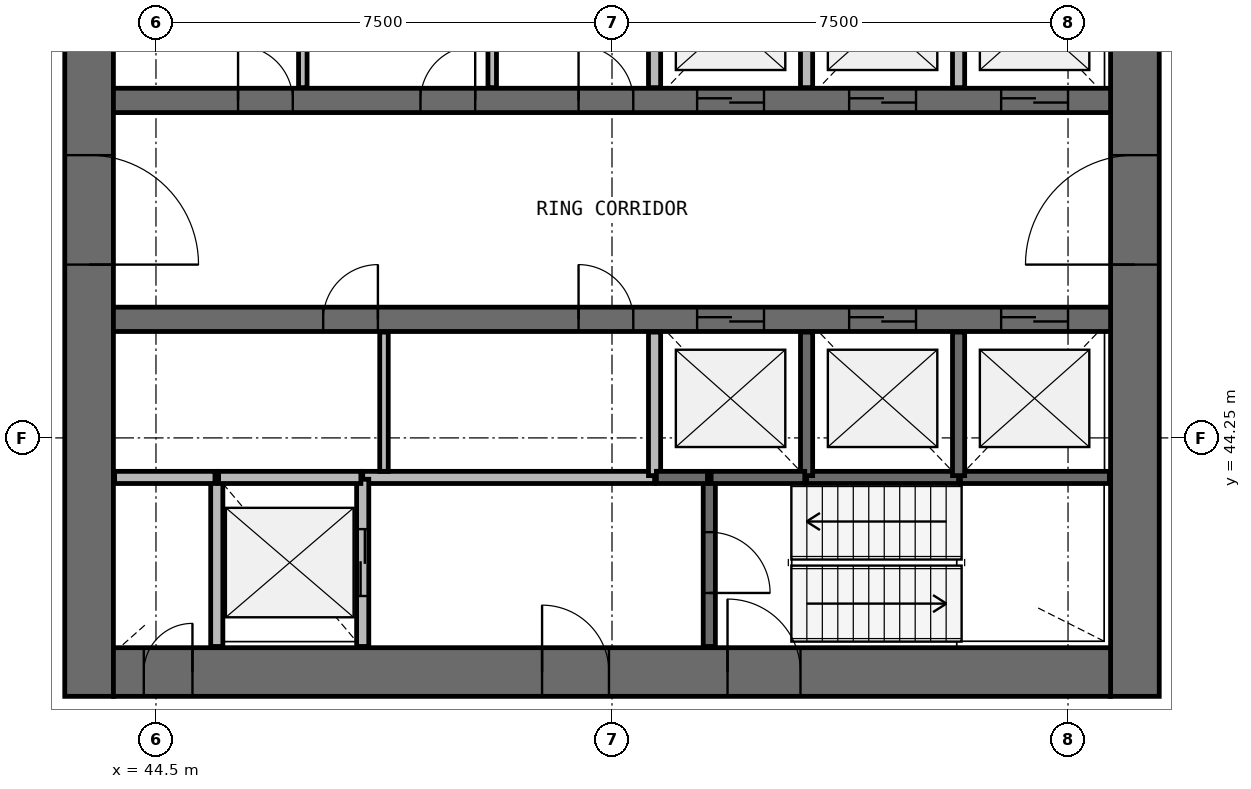
"""IFC4 building model, lengths in metres.
Left out: names, types, materials, properties, quantities, classifications, styles, units other than length and angle.
Written with IfcOpenShell. Run it as: python <this file> out.ifc"""

import sys

from ifc_helpers import new_model, si_unit, direction, frame, frame_2d, origin, place, context, subcontext, project, spatial, rectangle, extrude, source, transform, mapped, element, fill, save


model = new_model("IFC4")
c1 = context("Model", 3, precision=1e-05, world=origin(), true_north=direction((0.0, 1.0)))
c2 = subcontext(c1, "Body", "Model", "MODEL_VIEW")
j1 = project(units=[si_unit("LENGTHUNIT", "METRE"), si_unit("PLANEANGLEUNIT", "RADIAN")], contexts=[c1])
p1 = place(None, origin())
s1 = spatial("IfcSite", under=j1, at=p1, CompositionType="ELEMENT")
p2 = place(p1, origin())
s2 = spatial("IfcBuilding", under=s1, at=p2, CompositionType="ELEMENT")
p3 = place(p2, frame((0.0, 0.0, 168.2)))
s3 = spatial("IfcBuildingStorey", under=s2, at=p3, CompositionType="ELEMENT", Elevation=168.2)
p4 = place(p3, frame((60.6, 40.0, 0.0), z_axis=(0.0, 0.0, 1.0), x_axis=(0.0, 1.0, 0.0)))
e1 = element("IfcWall", 1, at=p4, inside=s3, PredefinedType="SHEAR", context=c2, shape_type="SweptSolid", body=[
    extrude(rectangle(XDim=16.0, YDim=0.8, at=frame_2d((8.0, 0.0))), origin(), (0.0, 0.0, 1.0), 3.9),
])
p5 = place(p4, frame((7.1, 0.0, 0.0)))
e2 = element("IfcOpeningElement", 2, at=p5, cuts=e1, PredefinedType="OPENING", context=c2, shape_type="SweptSolid", body=[
    extrude(rectangle(XDim=1.8, YDim=2.1, at=frame_2d((0.9, 1.05))), frame((0.0, 0.41, 0.0), z_axis=(0.0, -1.0, 0.0), x_axis=(1.0, 0.0, 0.0)), (0.0, 0.0, 1.0), 0.82),
])
p6 = place(p3, frame((43.4, 56.0, 0.0), z_axis=(0.0, 0.0, 1.0), x_axis=(0.0, -1.0, 0.0)))
e3 = element("IfcWall", 3, at=p6, inside=s3, PredefinedType="SHEAR", context=c2, shape_type="SweptSolid", body=[
    extrude(rectangle(XDim=16.0, YDim=0.8, at=frame_2d((8.0, 0.0))), origin(), (0.0, 0.0, 1.0), 3.9),
])
p7 = place(p6, frame((7.1, 0.0, 0.0)))
e4 = element("IfcOpeningElement", 4, at=p7, cuts=e3, PredefinedType="OPENING", context=c2, shape_type="SweptSolid", body=[
    extrude(rectangle(XDim=1.8, YDim=2.1, at=frame_2d((0.9, 1.05))), frame((0.0, 0.41, 0.0), z_axis=(0.0, -1.0, 0.0), x_axis=(1.0, 0.0, 0.0)), (0.0, 0.0, 1.0), 0.82),
])
p8 = place(p3, frame((43.8, 40.4, 0.0), z_axis=(0.0, 0.0, 1.0), x_axis=(1.0, 0.0, 0.0)))
e5 = element("IfcWall", 5, at=p8, inside=s3, PredefinedType="SHEAR", context=c2, shape_type="SweptSolid", body=[
    extrude(rectangle(XDim=16.4, YDim=0.8, at=frame_2d((8.2, 0.0))), origin(), (0.0, 0.0, 1.0), 3.9),
])
p9 = place(p8, frame((10.1, 0.0, 0.0)))
e6 = element("IfcOpeningElement", 6, at=p9, cuts=e5, PredefinedType="OPENING", context=c2, shape_type="SweptSolid", body=[
    extrude(rectangle(XDim=1.2, YDim=2.1, at=frame_2d((0.6, 1.05))), frame((0.0, 0.41, 0.0), z_axis=(0.0, -1.0, 0.0), x_axis=(1.0, 0.0, 0.0)), (0.0, 0.0, 1.0), 0.82),
])
p10 = place(p8, frame((7.05, 0.0, 0.0)))
e7 = element("IfcOpeningElement", 7, at=p10, cuts=e5, PredefinedType="OPENING", context=c2, shape_type="SweptSolid", body=[
    extrude(rectangle(XDim=1.1, YDim=2.1, at=frame_2d((0.55, 1.05))), frame((0.0, 0.41, 0.0), z_axis=(0.0, -1.0, 0.0), x_axis=(1.0, 0.0, 0.0)), (0.0, 0.0, 1.0), 0.82),
])
p11 = place(p8, frame((0.5, 0.0, 0.0)))
e8 = element("IfcOpeningElement", 8, at=p11, cuts=e5, PredefinedType="OPENING", context=c2, shape_type="SweptSolid", body=[
    extrude(rectangle(XDim=0.8, YDim=2.1, at=frame_2d((0.4, 1.05))), frame((0.0, 0.41, 0.0), z_axis=(0.0, -1.0, 0.0), x_axis=(1.0, 0.0, 0.0)), (0.0, 0.0, 1.0), 0.82),
])
p12 = place(p3, frame((43.8, 49.8, 0.0), z_axis=(0.0, 0.0, 1.0), x_axis=(1.0, 0.0, 0.0)))
e9 = element("IfcWall", 9, at=p12, inside=s3, PredefinedType="SHEAR", context=c2, shape_type="SweptSolid", body=[
    extrude(rectangle(XDim=16.4, YDim=0.4, at=frame_2d((8.2, 0.0))), origin(), (0.0, 0.0, 1.0), 3.9),
])
p13 = place(p12, frame((9.6, 0.0, 0.0)))
e10 = element("IfcOpeningElement", 10, at=p13, cuts=e9, PredefinedType="OPENING", context=c2, shape_type="SweptSolid", body=[
    extrude(rectangle(XDim=1.1, YDim=2.1, at=frame_2d((0.55, 1.05))), frame((0.0, 0.21, 0.0), z_axis=(0.0, -1.0, 0.0), x_axis=(1.0, 0.0, 0.0)), (0.0, 0.0, 1.0), 0.42),
])
p14 = place(p12, frame((12.1, 0.0, 0.0)))
e11 = element("IfcOpeningElement", 11, at=p14, cuts=e9, PredefinedType="OPENING", context=c2, shape_type="SweptSolid", body=[
    extrude(rectangle(XDim=1.1, YDim=2.1, at=frame_2d((0.55, 1.05))), frame((0.0, 0.21, 0.0), z_axis=(0.0, -1.0, 0.0), x_axis=(1.0, 0.0, 0.0)), (0.0, 0.0, 1.0), 0.42),
])
p15 = place(p12, frame((14.6, 0.0, 0.0)))
e12 = element("IfcOpeningElement", 12, at=p15, cuts=e9, PredefinedType="OPENING", context=c2, shape_type="SweptSolid", body=[
    extrude(rectangle(XDim=1.1, YDim=2.1, at=frame_2d((0.55, 1.05))), frame((0.0, 0.21, 0.0), z_axis=(0.0, -1.0, 0.0), x_axis=(1.0, 0.0, 0.0)), (0.0, 0.0, 1.0), 0.42),
])
p16 = place(p12, frame((2.05, 0.0, 0.0)))
e13 = element("IfcOpeningElement", 13, at=p16, cuts=e9, PredefinedType="OPENING", context=c2, shape_type="SweptSolid", body=[
    extrude(rectangle(XDim=0.9, YDim=2.1, at=frame_2d((0.45, 1.05))), frame((0.0, 0.21, 0.0), z_axis=(0.0, -1.0, 0.0), x_axis=(1.0, 0.0, 0.0)), (0.0, 0.0, 1.0), 0.42),
])
p17 = place(p12, frame((5.05, 0.0, 0.0)))
e14 = element("IfcOpeningElement", 14, at=p17, cuts=e9, PredefinedType="OPENING", context=c2, shape_type="SweptSolid", body=[
    extrude(rectangle(XDim=0.9, YDim=2.1, at=frame_2d((0.45, 1.05))), frame((0.0, 0.21, 0.0), z_axis=(0.0, -1.0, 0.0), x_axis=(1.0, 0.0, 0.0)), (0.0, 0.0, 1.0), 0.42),
])
p18 = place(p12, frame((7.65, 0.0, 0.0)))
e15 = element("IfcOpeningElement", 15, at=p18, cuts=e9, PredefinedType="OPENING", context=c2, shape_type="SweptSolid", body=[
    extrude(rectangle(XDim=0.9, YDim=2.1, at=frame_2d((0.45, 1.05))), frame((0.0, 0.21, 0.0), z_axis=(0.0, -1.0, 0.0), x_axis=(1.0, 0.0, 0.0)), (0.0, 0.0, 1.0), 0.42),
])
p19 = place(p3, frame((43.8, 46.2, 0.0), z_axis=(0.0, 0.0, 1.0), x_axis=(1.0, 0.0, 0.0)))
e16 = element("IfcWall", 16, at=p19, inside=s3, PredefinedType="SHEAR", context=c2, shape_type="SweptSolid", body=[
    extrude(rectangle(XDim=16.4, YDim=0.4, at=frame_2d((8.2, 0.0))), origin(), (0.0, 0.0, 1.0), 3.9),
])
p20 = place(p19, frame((9.6, 0.0, 0.0)))
e17 = element("IfcOpeningElement", 17, at=p20, cuts=e16, PredefinedType="OPENING", context=c2, shape_type="SweptSolid", body=[
    extrude(rectangle(XDim=1.1, YDim=2.1, at=frame_2d((0.55, 1.05))), frame((0.0, 0.21, 0.0), z_axis=(0.0, -1.0, 0.0), x_axis=(1.0, 0.0, 0.0)), (0.0, 0.0, 1.0), 0.42),
])
p21 = place(p19, frame((12.1, 0.0, 0.0)))
e18 = element("IfcOpeningElement", 18, at=p21, cuts=e16, PredefinedType="OPENING", context=c2, shape_type="SweptSolid", body=[
    extrude(rectangle(XDim=1.1, YDim=2.1, at=frame_2d((0.55, 1.05))), frame((0.0, 0.21, 0.0), z_axis=(0.0, -1.0, 0.0), x_axis=(1.0, 0.0, 0.0)), (0.0, 0.0, 1.0), 0.42),
])
p22 = place(p19, frame((14.6, 0.0, 0.0)))
e19 = element("IfcOpeningElement", 19, at=p22, cuts=e16, PredefinedType="OPENING", context=c2, shape_type="SweptSolid", body=[
    extrude(rectangle(XDim=1.1, YDim=2.1, at=frame_2d((0.55, 1.05))), frame((0.0, 0.21, 0.0), z_axis=(0.0, -1.0, 0.0), x_axis=(1.0, 0.0, 0.0)), (0.0, 0.0, 1.0), 0.42),
])
p23 = place(p19, frame((3.45, 0.0, 0.0)))
e20 = element("IfcOpeningElement", 20, at=p23, cuts=e16, PredefinedType="OPENING", context=c2, shape_type="SweptSolid", body=[
    extrude(rectangle(XDim=0.9, YDim=2.1, at=frame_2d((0.45, 1.05))), frame((0.0, 0.21, 0.0), z_axis=(0.0, -1.0, 0.0), x_axis=(1.0, 0.0, 0.0)), (0.0, 0.0, 1.0), 0.42),
])
p24 = place(p19, frame((7.65, 0.0, 0.0)))
e21 = element("IfcOpeningElement", 21, at=p24, cuts=e16, PredefinedType="OPENING", context=c2, shape_type="SweptSolid", body=[
    extrude(rectangle(XDim=0.9, YDim=2.1, at=frame_2d((0.45, 1.05))), frame((0.0, 0.21, 0.0), z_axis=(0.0, -1.0, 0.0), x_axis=(1.0, 0.0, 0.0)), (0.0, 0.0, 1.0), 0.42),
])
p25 = place(p3, frame((52.7, 43.6, 0.0), z_axis=(0.0, 0.0, 1.0), x_axis=(-1.0, 0.0, 0.0)))
e22 = element("IfcWall", 22, at=p25, inside=s3, PredefinedType="SOLIDWALL", context=c2, shape_type="SweptSolid", body=[
    extrude(rectangle(XDim=4.8, YDim=0.2, at=frame_2d((2.4, 0.0))), origin(), (0.0, 0.0, 1.0), 3.58),
])
p26 = place(p3, frame((45.5, 43.6, 0.0), z_axis=(0.0, 0.0, 1.0), x_axis=(0.0, -1.0, 0.0)))
e23 = element("IfcWall", 23, at=p26, inside=s3, PredefinedType="SOLIDWALL", context=c2, shape_type="SweptSolid", body=[
    extrude(rectangle(XDim=2.78, YDim=0.2, at=frame_2d((1.39, 0.0))), origin(), (0.0, 0.0, 1.0), 3.58),
])
p27 = place(p3, frame((47.9, 40.82, 0.0), z_axis=(0.0, 0.0, 1.0), x_axis=(0.0, 1.0, 0.0)))
e24 = element("IfcWall", 24, at=p27, inside=s3, PredefinedType="SOLIDWALL", context=c2, shape_type="SweptSolid", body=[
    extrude(rectangle(XDim=2.75, YDim=0.2, at=frame_2d((1.375, 0.0))), origin(), (0.0, 0.0, 1.0), 3.58),
])
p28 = place(p27, frame((0.83, 0.0, 0.0)))
e25 = element("IfcOpeningElement", 25, at=p28, cuts=e24, PredefinedType="OPENING", context=c2, shape_type="SweptSolid", body=[
    extrude(rectangle(XDim=1.1, YDim=2.1, at=frame_2d((0.55, 1.05))), frame((0.0, 0.11, 0.0), z_axis=(0.0, -1.0, 0.0), x_axis=(1.0, 0.0, 0.0)), (0.0, 0.0, 1.0), 0.22),
])
p29 = place(p3, frame((53.6, 43.6, 0.0), z_axis=(0.0, 0.0, 1.0), x_axis=(0.0, -1.0, 0.0)))
e26 = element("IfcWall", 26, at=p29, inside=s3, PredefinedType="SOLIDWALL", context=c2, shape_type="SweptSolid", body=[
    extrude(rectangle(XDim=2.78, YDim=0.2, at=frame_2d((1.39, 0.0))), origin(), (0.0, 0.0, 1.0), 3.58),
])
p30 = place(p29, frame((0.9, 0.0, 0.0)))
e27 = element("IfcOpeningElement", 27, at=p30, cuts=e26, PredefinedType="OPENING", context=c2, shape_type="SweptSolid", body=[
    extrude(rectangle(XDim=1.0, YDim=2.1, at=frame_2d((0.5, 1.05))), frame((0.0, 0.11, 0.0), z_axis=(0.0, -1.0, 0.0), x_axis=(1.0, 0.0, 0.0)), (0.0, 0.0, 1.0), 0.22),
])
p31 = place(p3, frame((55.2, 43.6, 0.0), z_axis=(0.0, 0.0, 1.0), x_axis=(1.0, 0.0, 0.0)))
e28 = element("IfcWall", 28, at=p31, inside=s3, PredefinedType="SOLIDWALL", context=c2, shape_type="SweptSolid", body=[
    extrude(rectangle(XDim=2.5, YDim=0.2, at=frame_2d((1.25, 0.0))), origin(), (0.0, 0.0, 1.0), 3.58),
])
p32 = place(p3, frame((57.73, 43.6, 0.0), z_axis=(0.0, 0.0, 1.0), x_axis=(1.0, 0.0, 0.0)))
e29 = element("IfcWall", 29, at=p32, inside=s3, PredefinedType="SOLIDWALL", context=c2, shape_type="SweptSolid", body=[
    extrude(rectangle(XDim=2.45, YDim=0.2, at=frame_2d((1.225, 0.0))), origin(), (0.0, 0.0, 1.0), 3.58),
])
p33 = place(p3, frame((47.87, 43.6, 0.0), z_axis=(0.0, 0.0, 1.0), x_axis=(-1.0, 0.0, 0.0)))
e30 = element("IfcWall", 30, at=p33, inside=s3, PredefinedType="SOLIDWALL", context=c2, shape_type="SweptSolid", body=[
    extrude(rectangle(XDim=2.34, YDim=0.2, at=frame_2d((1.17, 0.0))), origin(), (0.0, 0.0, 1.0), 3.58),
])
for number, where, z_axis, x_axis in (
    (31, (52.7, 45.99, 0.0), (0.0, 0.0, 1.0), (0.0, -1.0, 0.0)),
    (32, (52.7, 52.37, 0.0), (0.0, 0.0, 1.0), (0.0, -1.0, 0.0)),
    (33, (55.2, 43.63, 0.0), (0.0, 0.0, 1.0), (0.0, 1.0, 0.0)),
    (34, (55.2, 50.01, 0.0), (0.0, 0.0, 1.0), (0.0, 1.0, 0.0)),
    (35, (57.7, 43.63, 0.0), (0.0, 0.0, 1.0), (0.0, 1.0, 0.0)),
):
    element("IfcWall", number, at=place(p3, frame(where, z_axis=z_axis, x_axis=x_axis)), inside=s3, PredefinedType="SOLIDWALL", context=c2, shape_type="SweptSolid", body=[
        extrude(rectangle(XDim=2.36, YDim=0.2, at=frame_2d((1.18, 0.0))), origin(), (0.0, 0.0, 1.0), 3.58),
    ])
p34 = place(p3, frame((57.7, 50.01, 0.0), z_axis=(0.0, 0.0, 1.0), x_axis=(0.0, 1.0, 0.0)))
e36 = element("IfcWall", 36, at=p34, inside=s3, PredefinedType="SOLIDWALL", context=c2, shape_type="SweptSolid", body=[
    extrude(rectangle(XDim=2.39, YDim=0.2, at=frame_2d((1.195, 0.0))), origin(), (0.0, 0.0, 1.0), 3.58),
])
p35 = place(p3, frame((45.47, 43.6, 0.0), z_axis=(0.0, 0.0, 1.0), x_axis=(-1.0, 0.0, 0.0)))
e37 = element("IfcWall", 37, at=p35, inside=s3, PredefinedType="SOLIDWALL", context=c2, shape_type="SweptSolid", body=[
    extrude(rectangle(XDim=1.65, YDim=0.2, at=frame_2d((0.825, 0.0))), origin(), (0.0, 0.0, 1.0), 3.58),
])
p36 = place(p3, frame((53.63, 43.6, 0.0), z_axis=(0.0, 0.0, 1.0), x_axis=(1.0, 0.0, 0.0)))
e38 = element("IfcWall", 38, at=p36, inside=s3, PredefinedType="SOLIDWALL", context=c2, shape_type="SweptSolid", body=[
    extrude(rectangle(XDim=1.54, YDim=0.2, at=frame_2d((0.77, 0.0))), origin(), (0.0, 0.0, 1.0), 3.58),
])
p37 = place(p3, frame((52.73, 43.6, 0.0), z_axis=(0.0, 0.0, 1.0), x_axis=(1.0, 0.0, 0.0)))
e39 = element("IfcWall", 39, at=p37, inside=s3, PredefinedType="SOLIDWALL", context=c2, shape_type="SweptSolid", body=[
    extrude(rectangle(XDim=0.84, YDim=0.2, at=frame_2d((0.42, 0.0))), origin(), (0.0, 0.0, 1.0), 3.58),
])
for number, where, z_axis, x_axis in (
    (40, (46.915, 50.01, 0.0), (0.0, 0.0, 1.0), (0.0, 1.0, 0.0)),
    (41, (48.25, 43.7, 0.0), (0.0, 0.0, 1.0), (0.0, 1.0, 0.0)),
    (42, (50.03, 50.01, 0.0), (0.0, 0.0, 1.0), (0.0, 1.0, 0.0)),
):
    element("IfcWall", number, at=place(p3, frame(where, z_axis=z_axis, x_axis=x_axis)), inside=s3, PredefinedType="PARTITIONING", context=c2, shape_type="SweptSolid", body=[
        extrude(rectangle(XDim=2.29, YDim=0.14, at=frame_2d((1.145, 0.0))), origin(), (0.0, 0.0, 1.0), 2.88),
    ])
m1 = source(origin(), c2, "Body", "SweptSolid", [
    extrude(rectangle(XDim=1.8, YDim=2.1, at=frame_2d((0.9, 1.05))), frame((0.0, 0.025, 0.0), z_axis=(0.0, -1.0, 0.0), x_axis=(1.0, 0.0, 0.0)), (0.0, 0.0, 1.0), 0.05),
])
p38 = place(p7, origin())
e43 = element("IfcDoor", 43, at=p38, inside=s3, OperationType="SINGLE_SWING_RIGHT", PredefinedType="DOOR", context=c2, shape_type="MappedRepresentation", body=[
    mapped(m1, transform((0.0, 0.0, 0.0), scale=1.0)),
])
fill(e4, e43)
p39 = place(p5, origin())
e44 = element("IfcDoor", 44, at=p39, inside=s3, OperationType="SINGLE_SWING_LEFT", PredefinedType="DOOR", context=c2, shape_type="MappedRepresentation", body=[
    mapped(m1, transform((0.0, 0.0, 0.0), scale=1.0)),
])
fill(e2, e44)
m2 = source(origin(), c2, "Body", "SweptSolid", [
    extrude(rectangle(XDim=1.1, YDim=2.1, at=frame_2d((0.55, 1.05))), frame((0.0, 0.025, 0.0), z_axis=(0.0, -1.0, 0.0), x_axis=(1.0, 0.0, 0.0)), (0.0, 0.0, 1.0), 0.05),
])
p40 = place(p13, origin())
e45 = element("IfcDoor", 45, at=p40, inside=s3, OperationType="DOUBLE_DOOR_SLIDING", PredefinedType="USERDEFINED", context=c2, shape_type="MappedRepresentation", body=[
    mapped(m2, transform((0.0, 0.0, 0.0), scale=1.0)),
])
fill(e10, e45)
p41 = place(p14, origin())
e46 = element("IfcDoor", 46, at=p41, inside=s3, OperationType="DOUBLE_DOOR_SLIDING", PredefinedType="USERDEFINED", context=c2, shape_type="MappedRepresentation", body=[
    mapped(m2, transform((0.0, 0.0, 0.0), scale=1.0)),
])
fill(e11, e46)
p42 = place(p15, origin())
e47 = element("IfcDoor", 47, at=p42, inside=s3, OperationType="DOUBLE_DOOR_SLIDING", PredefinedType="USERDEFINED", context=c2, shape_type="MappedRepresentation", body=[
    mapped(m2, transform((0.0, 0.0, 0.0), scale=1.0)),
])
fill(e12, e47)
p43 = place(p20, origin())
e48 = element("IfcDoor", 48, at=p43, inside=s3, OperationType="DOUBLE_DOOR_SLIDING", PredefinedType="USERDEFINED", context=c2, shape_type="MappedRepresentation", body=[
    mapped(m2, transform((0.0, 0.0, 0.0), scale=1.0)),
])
fill(e17, e48)
p44 = place(p21, origin())
e49 = element("IfcDoor", 49, at=p44, inside=s3, OperationType="DOUBLE_DOOR_SLIDING", PredefinedType="USERDEFINED", context=c2, shape_type="MappedRepresentation", body=[
    mapped(m2, transform((0.0, 0.0, 0.0), scale=1.0)),
])
fill(e18, e49)
p45 = place(p22, origin())
e50 = element("IfcDoor", 50, at=p45, inside=s3, OperationType="DOUBLE_DOOR_SLIDING", PredefinedType="USERDEFINED", context=c2, shape_type="MappedRepresentation", body=[
    mapped(m2, transform((0.0, 0.0, 0.0), scale=1.0)),
])
fill(e19, e50)
p46 = place(p28, origin())
e51 = element("IfcDoor", 51, at=p46, inside=s3, OperationType="DOUBLE_DOOR_SLIDING", PredefinedType="USERDEFINED", context=c2, shape_type="MappedRepresentation", body=[
    mapped(m2, transform((0.0, 0.0, 0.0), scale=1.0)),
])
fill(e25, e51)
m3 = source(origin(), c2, "Body", "SweptSolid", [
    extrude(rectangle(XDim=1.2, YDim=2.1, at=frame_2d((0.6, 1.05))), frame((0.0, 0.025, 0.0), z_axis=(0.0, -1.0, 0.0), x_axis=(1.0, 0.0, 0.0)), (0.0, 0.0, 1.0), 0.05),
])
p47 = place(p9, origin())
e52 = element("IfcDoor", 52, at=p47, inside=s3, OperationType="SINGLE_SWING_LEFT", PredefinedType="DOOR", context=c2, shape_type="MappedRepresentation", body=[
    mapped(m3, transform((0.0, 0.0, 0.0), scale=1.0)),
])
fill(e6, e52)
m4 = source(origin(), c2, "Body", "SweptSolid", [
    extrude(rectangle(XDim=1.0, YDim=2.1, at=frame_2d((0.5, 1.05))), frame((0.0, 0.025, 0.0), z_axis=(0.0, -1.0, 0.0), x_axis=(1.0, 0.0, 0.0)), (0.0, 0.0, 1.0), 0.05),
])
p48 = place(p30, origin())
e53 = element("IfcDoor", 53, at=p48, inside=s3, OperationType="SINGLE_SWING_RIGHT", PredefinedType="DOOR", context=c2, shape_type="MappedRepresentation", body=[
    mapped(m4, transform((0.0, 0.0, 0.0), scale=1.0)),
])
fill(e27, e53)
m5 = source(origin(), c2, "Body", "SweptSolid", [
    extrude(rectangle(XDim=1.1, YDim=2.1, at=frame_2d((0.55, 1.05))), frame((0.0, 0.025, 0.0), z_axis=(0.0, -1.0, 0.0), x_axis=(1.0, 0.0, 0.0)), (0.0, 0.0, 1.0), 0.05),
])
p49 = place(p10, origin())
e54 = element("IfcDoor", 54, at=p49, inside=s3, OperationType="SINGLE_SWING_LEFT", PredefinedType="DOOR", context=c2, shape_type="MappedRepresentation", body=[
    mapped(m5, transform((0.0, 0.0, 0.0), scale=1.0)),
])
fill(e7, e54)
m6 = source(origin(), c2, "Body", "SweptSolid", [
    extrude(rectangle(XDim=0.8, YDim=2.1, at=frame_2d((0.4, 1.05))), frame((0.0, 0.025, 0.0), z_axis=(0.0, -1.0, 0.0), x_axis=(1.0, 0.0, 0.0)), (0.0, 0.0, 1.0), 0.05),
])
p50 = place(p11, origin())
e55 = element("IfcDoor", 55, at=p50, inside=s3, OperationType="SINGLE_SWING_RIGHT", PredefinedType="DOOR", context=c2, shape_type="MappedRepresentation", body=[
    mapped(m6, transform((0.0, 0.0, 0.0), scale=1.0)),
])
fill(e8, e55)
m7 = source(origin(), c2, "Body", "SweptSolid", [
    extrude(rectangle(XDim=0.9, YDim=2.1, at=frame_2d((0.45, 1.05))), frame((0.0, 0.025, 0.0), z_axis=(0.0, -1.0, 0.0), x_axis=(1.0, 0.0, 0.0)), (0.0, 0.0, 1.0), 0.05),
])
p51 = place(p16, origin())
e56 = element("IfcDoor", 56, at=p51, inside=s3, OperationType="SINGLE_SWING_LEFT", PredefinedType="DOOR", context=c2, shape_type="MappedRepresentation", body=[
    mapped(m7, transform((0.0, 0.0, 0.0), scale=1.0)),
])
fill(e13, e56)
p52 = place(p17, origin())
e57 = element("IfcDoor", 57, at=p52, inside=s3, OperationType="SINGLE_SWING_RIGHT", PredefinedType="DOOR", context=c2, shape_type="MappedRepresentation", body=[
    mapped(m7, transform((0.0, 0.0, 0.0), scale=1.0)),
])
fill(e14, e57)
p53 = place(p18, origin())
e58 = element("IfcDoor", 58, at=p53, inside=s3, OperationType="SINGLE_SWING_LEFT", PredefinedType="DOOR", context=c2, shape_type="MappedRepresentation", body=[
    mapped(m7, transform((0.0, 0.0, 0.0), scale=1.0)),
])
fill(e15, e58)
p54 = place(p23, origin())
e59 = element("IfcDoor", 59, at=p54, inside=s3, OperationType="SINGLE_SWING_RIGHT", PredefinedType="DOOR", context=c2, shape_type="MappedRepresentation", body=[
    mapped(m7, transform((0.0, 0.0, 0.0), scale=1.0)),
])
fill(e20, e59)
p55 = place(p24, origin())
e60 = element("IfcDoor", 60, at=p55, inside=s3, OperationType="SINGLE_SWING_LEFT", PredefinedType="DOOR", context=c2, shape_type="MappedRepresentation", body=[
    mapped(m7, transform((0.0, 0.0, 0.0), scale=1.0)),
])
fill(e21, e60)
save(model, sys.argv[1])
